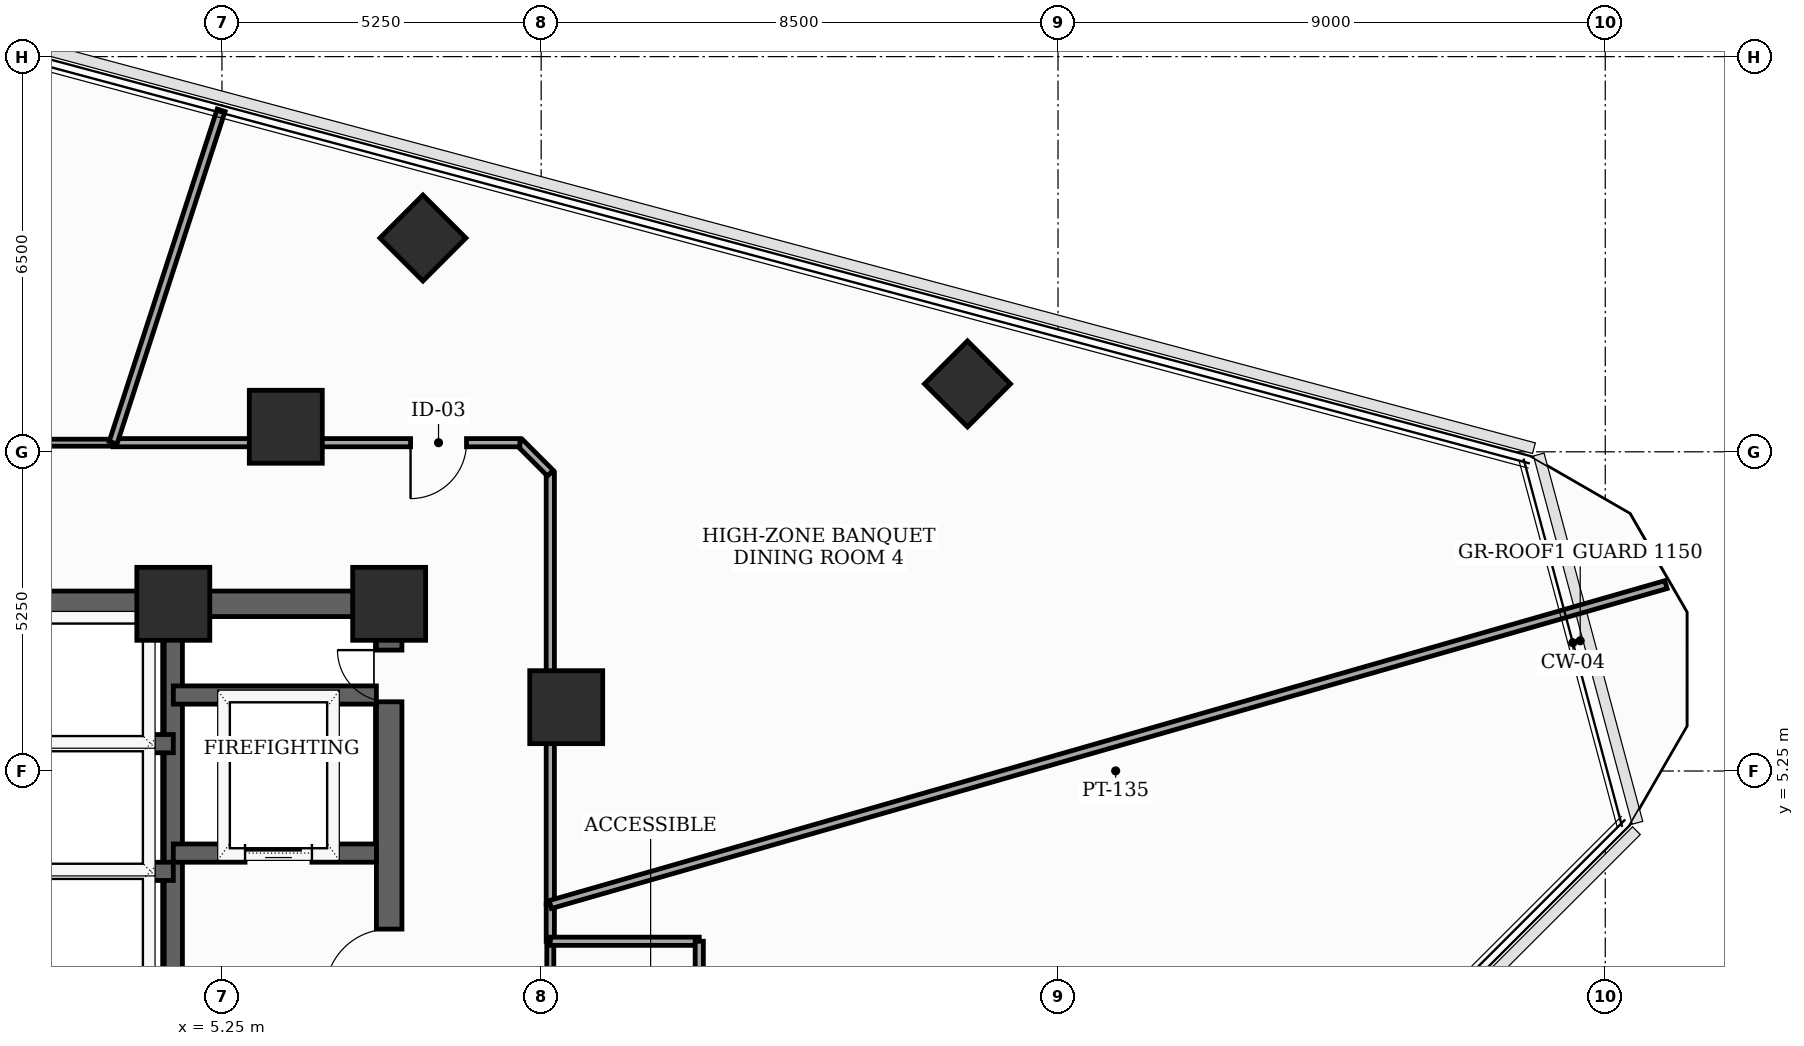
"""IFC4 building model, lengths in metres.
Left out: names, types, materials, properties, quantities, classifications, styles, units other than length and angle.
Written with IfcOpenShell. Run it as: python <this file> out.ifc"""

import sys

from ifc_helpers import new_model, si_unit, direction, frame, frame_2d, origin, origin_2d, place, context, subcontext, project, spatial, rectangle, extrude, element, fill, save


model = new_model("IFC4")
c1 = context("Model", 3, precision=1e-05, world=origin(), true_north=direction((0.0, 1.0)))
c2 = subcontext(c1, "Body", "Model", "MODEL_VIEW")
j1 = project(units=[si_unit("LENGTHUNIT", "METRE"), si_unit("PLANEANGLEUNIT", "RADIAN")], contexts=[c1])
p1 = place(None, origin())
s1 = spatial("IfcSite", under=j1, at=p1, CompositionType="ELEMENT")
p2 = place(p1, origin())
s2 = spatial("IfcBuilding", under=s1, at=p2, CompositionType="ELEMENT")
p3 = place(p2, frame((0.0, 0.0, 210.1)))
s3 = spatial("IfcBuildingStorey", under=s2, at=p3, CompositionType="ELEMENT", Elevation=210.1)
for number, where, z_axis, x_axis in (
    (1, (8.0, 8.0, 0.0), (0.0, 0.0, 1.0), (1.0, 0.0, 0.0)),
    (2, (4.45, 8.0, 0.0), (0.0, 0.0, 1.0), (1.0, 0.0, 0.0)),
    (3, (10.912, 6.3, 0.0), (0.0, 0.0, 1.0), (1.0, 0.0, 0.0)),
    (4, (6.3, 10.912, 0.0), (0.0, 0.0, 1.0), (1.0, 0.0, 0.0)),
):
    element("IfcColumn", number, at=place(p3, frame(where, z_axis=z_axis, x_axis=x_axis)), inside=s3, PredefinedType="COLUMN", context=c2, shape_type="SweptSolid", body=[
        extrude(rectangle(XDim=1.2, YDim=1.2, at=origin_2d()), origin(), (0.0, 0.0, 1.0), 3.7),
    ])
for number, where, z_axis, x_axis in (
    (5, (17.511, 11.616, 0.0), (0.0, 0.0, 1.0), (0.707, 0.707, 0.0)),
    (6, (8.555, 14.016, 0.0), (0.0, 0.0, 1.0), (0.707, 0.707, 0.0)),
):
    element("IfcColumn", number, at=place(p3, frame(where, z_axis=z_axis, x_axis=x_axis)), inside=s3, PredefinedType="COLUMN", context=c2, shape_type="SweptSolid", body=[
        extrude(rectangle(XDim=1.0, YDim=1.0, at=origin_2d()), origin(), (0.0, 0.0, 1.0), 3.7),
    ])
p4 = place(p3, frame((8.0, -8.0, 0.0), z_axis=(0.0, 0.0, 1.0), x_axis=(0.0, 1.0, 0.0)))
e7 = element("IfcWall", 7, at=p4, inside=s3, PredefinedType="SHEAR", context=c2, shape_type="SweptSolid", body=[
    extrude(rectangle(XDim=16.0, YDim=0.42, at=frame_2d((8.0, 0.0))), origin(), (0.0, 0.0, 1.0), 3.46),
])
p5 = place(p4, frame((9.6, 0.0, 0.0)))
e8 = element("IfcOpeningElement", 8, at=p5, cuts=e7, PredefinedType="OPENING", context=c2, shape_type="SweptSolid", body=[
    extrude(rectangle(XDim=1.05, YDim=2.15, at=frame_2d((0.525, 1.075))), frame((0.0, 0.22, 0.0), z_axis=(0.0, -1.0, 0.0), x_axis=(1.0, 0.0, 0.0)), (0.0, 0.0, 1.0), 0.44),
])
p6 = place(p4, frame((14.389, 0.0, 0.0)))
e9 = element("IfcOpeningElement", 9, at=p6, cuts=e7, PredefinedType="OPENING", context=c2, shape_type="SweptSolid", body=[
    extrude(rectangle(XDim=0.85, YDim=2.02, at=frame_2d((0.425, 1.01))), frame((0.0, 0.22, 0.0), z_axis=(0.0, -1.0, 0.0), x_axis=(1.0, 0.0, 0.0)), (0.0, 0.0, 1.0), 0.44),
])
p7 = place(p3, frame((-8.0, 8.0, 0.0), z_axis=(0.0, 0.0, 1.0), x_axis=(1.0, 0.0, 0.0)))
e10 = element("IfcWall", 10, at=p7, inside=s3, PredefinedType="SHEAR", context=c2, shape_type="SweptSolid", body=[
    extrude(rectangle(XDim=16.0, YDim=0.42, at=frame_2d((8.0, 0.0))), origin(), (0.0, 0.0, 1.0), 3.46),
])
p8 = place(p7, frame((7.1, 0.0, 0.0)))
e11 = element("IfcOpeningElement", 11, at=p8, cuts=e10, PredefinedType="OPENING", context=c2, shape_type="SweptSolid", body=[
    extrude(rectangle(XDim=1.8, YDim=2.15, at=frame_2d((0.9, 1.075))), frame((0.0, 0.22, 0.0), z_axis=(0.0, -1.0, 0.0), x_axis=(1.0, 0.0, 0.0)), (0.0, 0.0, 1.0), 0.44),
])
p9 = place(p3, frame((4.45, -7.79, 0.0), z_axis=(0.0, 0.0, 1.0), x_axis=(0.0, 1.0, 0.0)))
e12 = element("IfcWall", 12, at=p9, inside=s3, PredefinedType="SHEAR", context=c2, shape_type="SweptSolid", body=[
    extrude(rectangle(XDim=15.58, YDim=0.3, at=frame_2d((7.79, 0.0))), origin(), (0.0, 0.0, 1.0), 3.46),
])
p10 = place(p3, frame((4.45, 3.9, 0.0), z_axis=(0.0, 0.0, 1.0), x_axis=(1.0, 0.0, 0.0)))
e13 = element("IfcWall", 13, at=p10, inside=s3, PredefinedType="SHEAR", context=c2, shape_type="SweptSolid", body=[
    extrude(rectangle(XDim=3.34, YDim=0.3, at=frame_2d((1.67, 0.0))), origin(), (0.0, 0.0, 1.0), 3.46),
])
p11 = place(p10, frame((1.18, 0.0, 0.0)))
e14 = element("IfcOpeningElement", 14, at=p11, cuts=e13, PredefinedType="OPENING", context=c2, shape_type="SweptSolid", body=[
    extrude(rectangle(XDim=1.1, YDim=2.1, at=frame_2d((0.55, 1.05))), frame((0.0, 0.16, 0.0), z_axis=(0.0, -1.0, 0.0), x_axis=(1.0, 0.0, 0.0)), (0.0, 0.0, 1.0), 0.32),
])
p12 = place(p3, frame((4.45, 6.5, 0.0), z_axis=(0.0, 0.0, 1.0), x_axis=(1.0, 0.0, 0.0)))
e15 = element("IfcWall", 15, at=p12, inside=s3, PredefinedType="SHEAR", context=c2, shape_type="SweptSolid", body=[
    extrude(rectangle(XDim=3.34, YDim=0.3, at=frame_2d((1.67, 0.0))), origin(), (0.0, 0.0, 1.0), 3.46),
])
for number, where, z_axis, x_axis in (
    (16, (1.68, 3.6, 0.0), (0.0, 0.0, 1.0), (1.0, 0.0, 0.0)),
    (17, (1.68, 5.7, 0.0), (0.0, 0.0, 1.0), (1.0, 0.0, 0.0)),
):
    element("IfcWall", number, at=place(p3, frame(where, z_axis=z_axis, x_axis=x_axis)), inside=s3, PredefinedType="SHEAR", context=c2, shape_type="SweptSolid", body=[
        extrude(rectangle(XDim=2.77, YDim=0.3, at=frame_2d((1.385, 0.0))), origin(), (0.0, 0.0, 1.0), 3.46),
    ])
p13 = place(p3, frame((10.65, 2.45, 0.0), z_axis=(0.0, 0.0, 1.0), x_axis=(0.0, 1.0, 0.0)))
e18 = element("IfcWall", 18, at=p13, inside=s3, PredefinedType="PARTITIONING", context=c2, shape_type="SweptSolid", body=[
    extrude(rectangle(XDim=0.604, YDim=0.135, at=frame_2d((0.302, 0.0))), origin(), (0.0, 0.0, 1.0), 3.46),
])
p14 = place(p3, frame((10.65, 0.0, 0.0), z_axis=(0.0, 0.0, 1.0), x_axis=(0.0, 1.0, 0.0)))
e19 = element("IfcWall", 19, at=p14, inside=s3, PredefinedType="PARTITIONING", context=c2, shape_type="SweptSolid", body=[
    extrude(rectangle(XDim=2.45, YDim=0.115, at=frame_2d((1.225, 0.0))), origin(), (0.0, 0.0, 1.0), 2.845),
])
p15 = place(p14, frame((0.765, 0.0, 0.0)))
e20 = element("IfcOpeningElement", 20, at=p15, cuts=e19, PredefinedType="OPENING", context=c2, shape_type="SweptSolid", body=[
    extrude(rectangle(XDim=0.92, YDim=2.1, at=frame_2d((0.46, 1.05))), frame((0.0, 0.067, 0.0), z_axis=(0.0, -1.0, 0.0), x_axis=(1.0, 0.0, 0.0)), (0.0, 0.0, 1.0), 0.135),
])
p16 = place(p3, frame((10.65, 3.054, 0.0), z_axis=(0.0, 0.0, 1.0), x_axis=(0.0, 1.0, 0.0)))
e21 = element("IfcWall", 21, at=p16, inside=s3, PredefinedType="PARTITIONING", context=c2, shape_type="SweptSolid", body=[
    extrude(rectangle(XDim=7.096, YDim=0.135, at=frame_2d((3.548, 0.0))), origin(), (0.0, 0.0, 1.0), 2.045),
])
p17 = place(p3, frame((10.65, 10.15, 0.0), z_axis=(0.0, 0.0, 1.0), x_axis=(-0.707106781187, 0.707106781187, 0.0)))
e22 = element("IfcWall", 22, at=p17, inside=s3, PredefinedType="PARTITIONING", context=c2, shape_type="SweptSolid", body=[
    extrude(rectangle(XDim=0.707, YDim=0.135, at=frame_2d((0.354, 0.0))), origin(), (0.0, 0.0, 1.0), 3.46),
])
p18 = place(p3, frame((10.15, 10.65, 0.0), z_axis=(0.0, 0.0, 1.0), x_axis=(-1.0, 0.0, 0.0)))
e23 = element("IfcWall", 23, at=p18, inside=s3, PredefinedType="PARTITIONING", context=c2, shape_type="SweptSolid", body=[
    extrude(rectangle(XDim=6.69, YDim=0.135, at=frame_2d((3.345, 0.0))), origin(), (0.0, 0.0, 1.0), 2.045),
])
p19 = place(p18, frame((0.878, 0.0, 0.0)))
e24 = element("IfcOpeningElement", 24, at=p19, cuts=e23, PredefinedType="OPENING", context=c2, shape_type="SweptSolid", body=[
    extrude(rectangle(XDim=0.92, YDim=2.0, at=frame_2d((0.46, 1.0))), frame((0.0, 0.077, 0.0), z_axis=(0.0, -1.0, 0.0), x_axis=(1.0, 0.0, 0.0)), (0.0, 0.0, 1.0), 0.155),
])
p20 = place(p3, frame((3.46, 10.65, 0.0), z_axis=(0.0, 0.0, 1.0), x_axis=(-1.0, 0.0, 0.0)))
e25 = element("IfcWall", 25, at=p20, inside=s3, PredefinedType="PARTITIONING", context=c2, shape_type="SweptSolid", body=[
    extrude(rectangle(XDim=10.644, YDim=0.115, at=frame_2d((5.322, 0.0))), origin(), (0.0, 0.0, 1.0), 2.045),
])
p21 = place(p20, frame((4.847, 0.0, 0.0)))
e26 = element("IfcOpeningElement", 26, at=p21, cuts=e25, PredefinedType="OPENING", context=c2, shape_type="SweptSolid", body=[
    extrude(rectangle(XDim=0.95, YDim=2.0, at=frame_2d((0.475, 1.0))), frame((0.0, 0.067, 0.0), z_axis=(0.0, -1.0, 0.0), x_axis=(1.0, 0.0, 0.0)), (0.0, 0.0, 1.0), 0.135),
])
p22 = place(p3, frame((10.65, 2.45, 0.0), z_axis=(0.0, 0.0, 1.0), x_axis=(1.0, 0.0, 0.0)))
e27 = element("IfcWall", 27, at=p22, inside=s3, PredefinedType="PARTITIONING", context=c2, shape_type="SweptSolid", body=[
    extrude(rectangle(XDim=2.45, YDim=0.135, at=frame_2d((1.225, 0.0))), origin(), (0.0, 0.0, 1.0), 2.845),
])
p23 = place(p3, frame((13.1, 2.45, 0.0), z_axis=(0.0, 0.0, 1.0), x_axis=(0.0, -1.0, 0.0)))
e28 = element("IfcWall", 28, at=p23, inside=s3, PredefinedType="PARTITIONING", context=c2, shape_type="SweptSolid", body=[
    extrude(rectangle(XDim=2.45, YDim=0.135, at=frame_2d((1.225, 0.0))), origin(), (0.0, 0.0, 1.0), 2.045),
])
p24 = place(p3, frame((28.998, 8.315, 0.0), z_axis=(0.0, 0.0, 1.0), x_axis=(-0.961257547597, -0.275651822392, 0.0)))
e29 = element("IfcWall", 29, at=p24, inside=s3, PredefinedType="PARTITIONING", context=c2, shape_type="SweptSolid", body=[
    extrude(rectangle(XDim=19.087, YDim=0.135, at=frame_2d((9.544, 0.0))), origin(), (0.0, 0.0, 1.0), 2.045),
])
p25 = place(p3, frame((5.236, 16.117, 0.0), z_axis=(0.0, 0.0, 1.0), x_axis=(-0.30901980801, -0.951055602085, 0.0)))
e30 = element("IfcWall", 30, at=p25, inside=s3, PredefinedType="PARTITIONING", context=c2, shape_type="SweptSolid", body=[
    extrude(rectangle(XDim=5.748, YDim=0.135, at=frame_2d((2.874, 0.0))), origin(), (0.0, 0.0, 1.0), 2.045),
])
p26 = place(p5, origin())
e31 = element("IfcDoor", 31, at=p26, inside=s3, OperationType="SINGLE_SWING_LEFT", PredefinedType="DOOR", context=c2, shape_type="SweptSolid", body=[
    extrude(rectangle(XDim=1.05, YDim=2.15, at=frame_2d((0.525, 1.075))), frame((0.0, 0.025, 0.0), z_axis=(0.0, -1.0, 0.0), x_axis=(1.0, 0.0, 0.0)), (0.0, 0.0, 1.0), 0.05),
])
fill(e8, e31)
p27 = place(p6, origin())
e32 = element("IfcDoor", 32, at=p27, inside=s3, OperationType="SINGLE_SWING_RIGHT", PredefinedType="TRAPDOOR", context=c2, shape_type="SweptSolid", body=[
    extrude(rectangle(XDim=0.85, YDim=2.02, at=frame_2d((0.425, 1.01))), frame((0.0, 0.025, 0.0), z_axis=(0.0, -1.0, 0.0), x_axis=(1.0, 0.0, 0.0)), (0.0, 0.0, 1.0), 0.05),
])
fill(e9, e32)
p28 = place(p11, origin())
e33 = element("IfcDoor", 33, at=p28, inside=s3, OperationType="SLIDING_TO_LEFT", PredefinedType="DOOR", context=c2, shape_type="SweptSolid", body=[
    extrude(rectangle(XDim=1.1, YDim=2.1, at=frame_2d((0.55, 1.05))), frame((0.0, 0.025, 0.0), z_axis=(0.0, -1.0, 0.0), x_axis=(1.0, 0.0, 0.0)), (0.0, 0.0, 1.0), 0.05),
])
fill(e14, e33)
p29 = place(p19, origin())
e34 = element("IfcDoor", 34, at=p29, inside=s3, OperationType="SINGLE_SWING_RIGHT", PredefinedType="DOOR", context=c2, shape_type="SweptSolid", body=[
    extrude(rectangle(XDim=0.92, YDim=2.0, at=frame_2d((0.46, 1.0))), frame((0.0, 0.025, 0.0), z_axis=(0.0, -1.0, 0.0), x_axis=(1.0, 0.0, 0.0)), (0.0, 0.0, 1.0), 0.05),
])
fill(e24, e34)
save(model, sys.argv[1])
